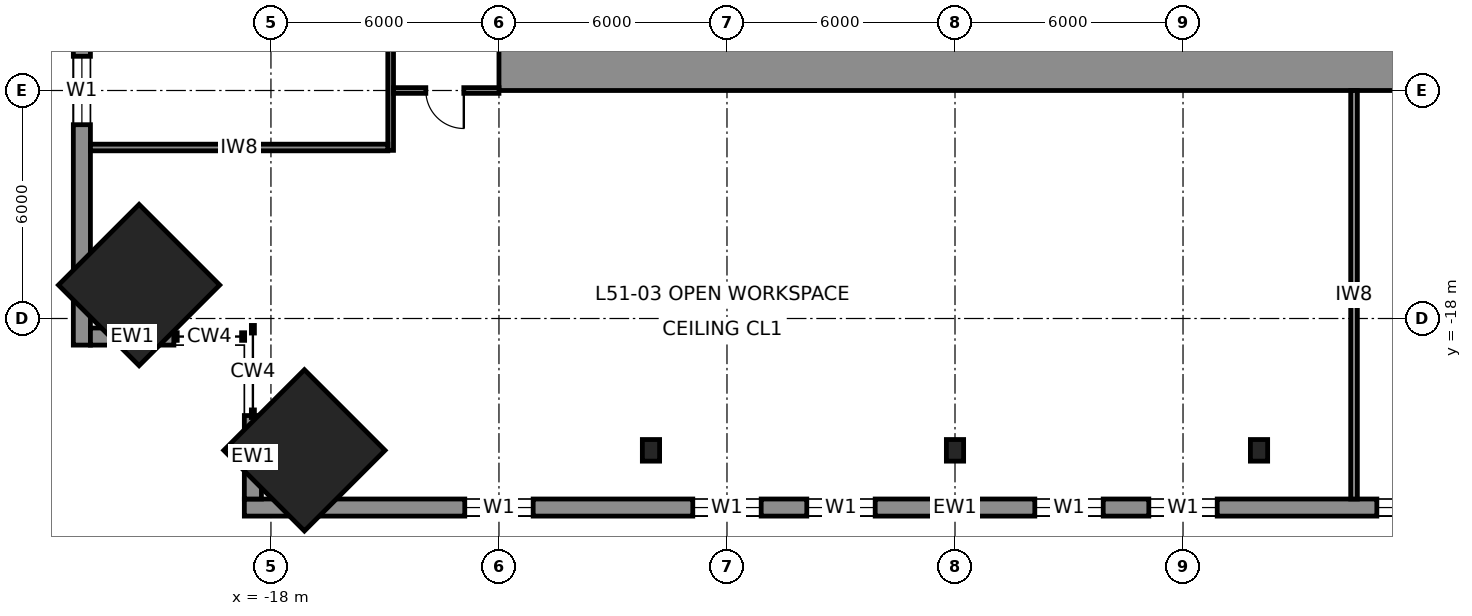
"""IFC4 building model, lengths in metres.
Left out: names, types, materials, properties, quantities, classifications, styles, units other than length and angle.
Written with IfcOpenShell. Run it as: python <this file> out.ifc"""

import sys

from ifc_helpers import new_model, si_unit, direction, frame, frame_2d, origin, origin_2d, place, context, subcontext, project, spatial, rectangle, i_section, extrude, element, fill, save


model = new_model("IFC4")
c1 = context("Model", 3, precision=1e-05, world=origin(), true_north=direction((0.0, 1.0)))
c2 = subcontext(c1, "Body", "Model", "MODEL_VIEW")
j1 = project(units=[si_unit("LENGTHUNIT", "METRE"), si_unit("PLANEANGLEUNIT", "RADIAN")], contexts=[c1])
p1 = place(None, origin())
s1 = spatial("IfcSite", under=j1, at=p1, CompositionType="ELEMENT")
p2 = place(p1, origin())
s2 = spatial("IfcBuilding", under=s1, at=p2, CompositionType="ELEMENT")
p3 = place(p2, frame((0.0, 0.0, 233.8)))
s3 = spatial("IfcBuildingStorey", under=s2, at=p3, CompositionType="ELEMENT", Elevation=233.8)
for number, where, z_axis, x_axis in (
    (1, (-17.119, -21.469, 0.0), (0.04, 0.04, 0.998), (-0.707, 0.708, 0.0)),
    (2, (-21.469, -17.119, 0.0), (0.04, 0.04, 0.998), (-0.708, 0.707, 0.0)),
):
    element("IfcColumn", number, at=place(p3, frame(where, z_axis=z_axis, x_axis=x_axis)), inside=s3, PredefinedType="COLUMN", context=c2, shape_type="SweptSolid", body=[
        extrude(rectangle(XDim=3.0, YDim=3.0, at=origin_2d()), origin(), (0.0, 0.0, 1.0), 4.007),
    ])
for number, where, z_axis, x_axis in (
    (3, (0.0, -21.469, 0.0), (0.0, 0.04, 0.999), (-1.0, 0.0, 0.0)),
    (4, (-8.0, -21.469, 0.0), (0.0, 0.04, 0.999), (-1.0, 0.0, 0.0)),
    (5, (8.0, -21.469, 0.0), (0.0, 0.04, 0.999), (-1.0, 0.0, 0.0)),
):
    element("IfcColumn", number, at=place(p3, frame(where, z_axis=z_axis, x_axis=x_axis)), inside=s3, PredefinedType="COLUMN", context=c2, shape_type="SweptSolid", body=[
        extrude(i_section(OverallWidth=0.454, OverallDepth=0.569, WebThickness=0.078, FlangeThickness=0.125, at=origin_2d()), origin(), (0.0, 0.0, 1.0), 4.003),
    ])
p4 = place(p3, frame((12.0, -11.25, 0.0), z_axis=(0.0, 0.0, 1.0), x_axis=(-1.0, 0.0, 0.0)))
e6 = element("IfcWall", 6, at=p4, inside=s3, PredefinedType="SHEAR", context=c2, shape_type="SweptSolid", body=[
    extrude(rectangle(XDim=24.0, YDim=1.5, at=frame_2d((12.0, 0.0))), origin(), (0.0, 0.0, 1.0), 4.0),
])
p5 = place(p3, frame((-18.7, -22.975, 0.0), z_axis=(0.0, 0.0, 1.0), x_axis=(1.0, 0.0, 0.0)))
e7 = element("IfcWall", 7, at=p5, inside=s3, PredefinedType="SOLIDWALL", context=c2, shape_type="SweptSolid", body=[
    extrude(rectangle(XDim=37.4, YDim=0.45, at=frame_2d((18.7, 0.0))), origin(), (0.0, 0.0, 1.0), 3.83),
])
p6 = place(p5, frame((5.8, 0.0, 0.7)))
e8 = element("IfcOpeningElement", 8, at=p6, cuts=e7, PredefinedType="OPENING", context=c2, shape_type="SweptSolid", body=[
    extrude(rectangle(XDim=1.8, YDim=2.6, at=frame_2d((0.9, 1.3))), frame((0.0, 0.235, 0.0), z_axis=(0.0, -1.0, 0.0), x_axis=(1.0, 0.0, 0.0)), (0.0, 0.0, 1.0), 0.47),
])
p7 = place(p5, frame((11.8, 0.0, 0.7)))
e9 = element("IfcOpeningElement", 9, at=p7, cuts=e7, PredefinedType="OPENING", context=c2, shape_type="SweptSolid", body=[
    extrude(rectangle(XDim=1.8, YDim=2.6, at=frame_2d((0.9, 1.3))), frame((0.0, 0.235, 0.0), z_axis=(0.0, -1.0, 0.0), x_axis=(1.0, 0.0, 0.0)), (0.0, 0.0, 1.0), 0.47),
])
p8 = place(p5, frame((14.8, 0.0, 0.7)))
e10 = element("IfcOpeningElement", 10, at=p8, cuts=e7, PredefinedType="OPENING", context=c2, shape_type="SweptSolid", body=[
    extrude(rectangle(XDim=1.8, YDim=2.6, at=frame_2d((0.9, 1.3))), frame((0.0, 0.235, 0.0), z_axis=(0.0, -1.0, 0.0), x_axis=(1.0, 0.0, 0.0)), (0.0, 0.0, 1.0), 0.47),
])
p9 = place(p5, frame((20.8, 0.0, 0.7)))
e11 = element("IfcOpeningElement", 11, at=p9, cuts=e7, PredefinedType="OPENING", context=c2, shape_type="SweptSolid", body=[
    extrude(rectangle(XDim=1.8, YDim=2.6, at=frame_2d((0.9, 1.3))), frame((0.0, 0.235, 0.0), z_axis=(0.0, -1.0, 0.0), x_axis=(1.0, 0.0, 0.0)), (0.0, 0.0, 1.0), 0.47),
])
p10 = place(p5, frame((23.8, 0.0, 0.7)))
e12 = element("IfcOpeningElement", 12, at=p10, cuts=e7, PredefinedType="OPENING", context=c2, shape_type="SweptSolid", body=[
    extrude(rectangle(XDim=1.8, YDim=2.6, at=frame_2d((0.9, 1.3))), frame((0.0, 0.235, 0.0), z_axis=(0.0, -1.0, 0.0), x_axis=(1.0, 0.0, 0.0)), (0.0, 0.0, 1.0), 0.47),
])
p11 = place(p5, frame((29.8, 0.0, 0.7)))
e13 = element("IfcOpeningElement", 13, at=p11, cuts=e7, PredefinedType="OPENING", context=c2, shape_type="SweptSolid", body=[
    extrude(rectangle(XDim=1.8, YDim=2.6, at=frame_2d((0.9, 1.3))), frame((0.0, 0.235, 0.0), z_axis=(0.0, -1.0, 0.0), x_axis=(1.0, 0.0, 0.0)), (0.0, 0.0, 1.0), 0.47),
])
p12 = place(p3, frame((-22.975, 18.7, 0.0), z_axis=(0.0, 0.0, 1.0), x_axis=(0.0, -1.0, 0.0)))
e14 = element("IfcWall", 14, at=p12, inside=s3, PredefinedType="SOLIDWALL", context=c2, shape_type="SweptSolid", body=[
    extrude(rectangle(XDim=37.4, YDim=0.45, at=frame_2d((18.7, 0.0))), origin(), (0.0, 0.0, 1.0), 3.83),
])
p13 = place(p12, frame((5.8, 0.0, 0.7)))
e15 = element("IfcOpeningElement", 15, at=p13, cuts=e14, PredefinedType="OPENING", context=c2, shape_type="SweptSolid", body=[
    extrude(rectangle(XDim=1.8, YDim=2.6, at=frame_2d((0.9, 1.3))), frame((0.0, 0.235, 0.0), z_axis=(0.0, -1.0, 0.0), x_axis=(1.0, 0.0, 0.0)), (0.0, 0.0, 1.0), 0.47),
])
p14 = place(p12, frame((11.8, 0.0, 0.7)))
e16 = element("IfcOpeningElement", 16, at=p14, cuts=e14, PredefinedType="OPENING", context=c2, shape_type="SweptSolid", body=[
    extrude(rectangle(XDim=1.8, YDim=2.6, at=frame_2d((0.9, 1.3))), frame((0.0, 0.235, 0.0), z_axis=(0.0, -1.0, 0.0), x_axis=(1.0, 0.0, 0.0)), (0.0, 0.0, 1.0), 0.47),
])
p15 = place(p12, frame((14.8, 0.0, 0.7)))
e17 = element("IfcOpeningElement", 17, at=p15, cuts=e14, PredefinedType="OPENING", context=c2, shape_type="SweptSolid", body=[
    extrude(rectangle(XDim=1.8, YDim=2.6, at=frame_2d((0.9, 1.3))), frame((0.0, 0.235, 0.0), z_axis=(0.0, -1.0, 0.0), x_axis=(1.0, 0.0, 0.0)), (0.0, 0.0, 1.0), 0.47),
])
p16 = place(p12, frame((20.8, 0.0, 0.7)))
e18 = element("IfcOpeningElement", 18, at=p16, cuts=e14, PredefinedType="OPENING", context=c2, shape_type="SweptSolid", body=[
    extrude(rectangle(XDim=1.8, YDim=2.6, at=frame_2d((0.9, 1.3))), frame((0.0, 0.235, 0.0), z_axis=(0.0, -1.0, 0.0), x_axis=(1.0, 0.0, 0.0)), (0.0, 0.0, 1.0), 0.47),
])
p17 = place(p12, frame((23.8, 0.0, 0.7)))
e19 = element("IfcOpeningElement", 19, at=p17, cuts=e14, PredefinedType="OPENING", context=c2, shape_type="SweptSolid", body=[
    extrude(rectangle(XDim=1.8, YDim=2.6, at=frame_2d((0.9, 1.3))), frame((0.0, 0.235, 0.0), z_axis=(0.0, -1.0, 0.0), x_axis=(1.0, 0.0, 0.0)), (0.0, 0.0, 1.0), 0.47),
])
p18 = place(p12, frame((29.8, 0.0, 0.7)))
e20 = element("IfcOpeningElement", 20, at=p18, cuts=e14, PredefinedType="OPENING", context=c2, shape_type="SweptSolid", body=[
    extrude(rectangle(XDim=1.8, YDim=2.6, at=frame_2d((0.9, 1.3))), frame((0.0, 0.235, 0.0), z_axis=(0.0, -1.0, 0.0), x_axis=(1.0, 0.0, 0.0)), (0.0, 0.0, 1.0), 0.47),
])
for number, where, z_axis, x_axis in (
    (21, (-18.475, -20.554, 0.0), (0.0, 0.0, 1.0), (0.0, -1.0, 0.0)),
    (22, (-20.554, -18.475, 0.0), (0.0, 0.0, 1.0), (-1.0, 0.0, 0.0)),
):
    element("IfcWall", number, at=place(p3, frame(where, z_axis=z_axis, x_axis=x_axis)), inside=s3, PredefinedType="SOLIDWALL", context=c2, shape_type="SweptSolid", body=[
        extrude(rectangle(XDim=2.196, YDim=0.45, at=frame_2d((1.098, 0.0))), origin(), (0.0, 0.0, 1.0), 3.83),
    ])
p19 = place(p3, frame((-14.85, 13.575, 0.0), z_axis=(0.0, 0.0, 1.0), x_axis=(0.0, -1.0, 0.0)))
e23 = element("IfcWall", 23, at=p19, inside=s3, PredefinedType="PARTITIONING", context=c2, shape_type="SweptSolid", body=[
    extrude(rectangle(XDim=27.15, YDim=0.15, at=frame_2d((13.575, 0.0))), origin(), (0.0, 0.0, 1.0), 3.83),
])
p20 = place(p19, frame((21.125, 0.0, 0.0)))
e24 = element("IfcOpeningElement", 24, at=p20, cuts=e23, PredefinedType="OPENING", context=c2, shape_type="SweptSolid", body=[
    extrude(rectangle(XDim=1.6, YDim=2.3, at=frame_2d((0.8, 1.15))), frame((0.0, 0.085, 0.0), z_axis=(0.0, -1.0, 0.0), x_axis=(1.0, 0.0, 0.0)), (0.0, 0.0, 1.0), 0.17),
])
p21 = place(p19, frame((16.575, 0.0, 0.0)))
e25 = element("IfcOpeningElement", 25, at=p21, cuts=e23, PredefinedType="OPENING", context=c2, shape_type="SweptSolid", body=[
    extrude(rectangle(XDim=1.0, YDim=2.3, at=frame_2d((0.5, 1.15))), frame((0.0, 0.085, 0.0), z_axis=(0.0, -1.0, 0.0), x_axis=(1.0, 0.0, 0.0)), (0.0, 0.0, 1.0), 0.17),
])
p22 = place(p19, frame((9.325, 0.0, 0.0)))
e26 = element("IfcOpeningElement", 26, at=p22, cuts=e23, PredefinedType="OPENING", context=c2, shape_type="SweptSolid", body=[
    extrude(rectangle(XDim=1.0, YDim=2.3, at=frame_2d((0.5, 1.15))), frame((0.0, 0.085, 0.0), z_axis=(0.0, -1.0, 0.0), x_axis=(1.0, 0.0, 0.0)), (0.0, 0.0, 1.0), 0.17),
])
p23 = place(p3, frame((-12.0, -12.0, 0.0), z_axis=(0.0, 0.0, 1.0), x_axis=(-1.0, 0.0, 0.0)))
e27 = element("IfcWall", 27, at=p23, inside=s3, PredefinedType="PARTITIONING", context=c2, shape_type="SweptSolid", body=[
    extrude(rectangle(XDim=2.775, YDim=0.15, at=frame_2d((1.387, 0.0))), origin(), (0.0, 0.0, 1.0), 3.83),
])
p24 = place(p23, frame((0.925, 0.0, 0.0)))
e28 = element("IfcOpeningElement", 28, at=p24, cuts=e27, PredefinedType="OPENING", context=c2, shape_type="SweptSolid", body=[
    extrude(rectangle(XDim=1.0, YDim=2.3, at=frame_2d((0.5, 1.15))), frame((0.0, 0.085, 0.0), z_axis=(0.0, -1.0, 0.0), x_axis=(1.0, 0.0, 0.0)), (0.0, 0.0, 1.0), 0.17),
])
p25 = place(p3, frame((-14.925, -13.5, 0.0), z_axis=(0.0, 0.0, 1.0), x_axis=(-1.0, 0.0, 0.0)))
e29 = element("IfcWall", 29, at=p25, inside=s3, PredefinedType="PARTITIONING", context=c2, shape_type="SweptSolid", body=[
    extrude(rectangle(XDim=7.825, YDim=0.175, at=frame_2d((3.913, 0.0))), origin(), (0.0, 0.0, 1.0), 3.83),
])
p26 = place(p3, frame((10.5, -12.0, 0.0), z_axis=(0.0, 0.0, 1.0), x_axis=(0.0, -1.0, 0.0)))
e30 = element("IfcWall", 30, at=p26, inside=s3, PredefinedType="PARTITIONING", context=c2, shape_type="SweptSolid", body=[
    extrude(rectangle(XDim=10.75, YDim=0.175, at=frame_2d((5.375, 0.0))), origin(), (0.0, 0.0, 1.0), 3.83),
])
p27 = place(p6, origin())
e31 = element("IfcWindow", 31, at=p27, inside=s3, PartitioningType="SINGLE_PANEL", PredefinedType="WINDOW", context=c2, shape_type="SweptSolid", body=[
    extrude(rectangle(XDim=1.8, YDim=2.6, at=frame_2d((0.9, 1.3))), frame((0.0, 0.03, 0.0), z_axis=(0.0, -1.0, 0.0), x_axis=(1.0, 0.0, 0.0)), (0.0, 0.0, 1.0), 0.06),
])
fill(e8, e31)
p28 = place(p7, origin())
e32 = element("IfcWindow", 32, at=p28, inside=s3, PartitioningType="SINGLE_PANEL", PredefinedType="WINDOW", context=c2, shape_type="SweptSolid", body=[
    extrude(rectangle(XDim=1.8, YDim=2.6, at=frame_2d((0.9, 1.3))), frame((0.0, 0.03, 0.0), z_axis=(0.0, -1.0, 0.0), x_axis=(1.0, 0.0, 0.0)), (0.0, 0.0, 1.0), 0.06),
])
fill(e9, e32)
p29 = place(p8, origin())
e33 = element("IfcWindow", 33, at=p29, inside=s3, PartitioningType="SINGLE_PANEL", PredefinedType="WINDOW", context=c2, shape_type="SweptSolid", body=[
    extrude(rectangle(XDim=1.8, YDim=2.6, at=frame_2d((0.9, 1.3))), frame((0.0, 0.03, 0.0), z_axis=(0.0, -1.0, 0.0), x_axis=(1.0, 0.0, 0.0)), (0.0, 0.0, 1.0), 0.06),
])
fill(e10, e33)
p30 = place(p9, origin())
e34 = element("IfcWindow", 34, at=p30, inside=s3, PartitioningType="SINGLE_PANEL", PredefinedType="WINDOW", context=c2, shape_type="SweptSolid", body=[
    extrude(rectangle(XDim=1.8, YDim=2.6, at=frame_2d((0.9, 1.3))), frame((0.0, 0.03, 0.0), z_axis=(0.0, -1.0, 0.0), x_axis=(1.0, 0.0, 0.0)), (0.0, 0.0, 1.0), 0.06),
])
fill(e11, e34)
p31 = place(p10, origin())
e35 = element("IfcWindow", 35, at=p31, inside=s3, PartitioningType="SINGLE_PANEL", PredefinedType="WINDOW", context=c2, shape_type="SweptSolid", body=[
    extrude(rectangle(XDim=1.8, YDim=2.6, at=frame_2d((0.9, 1.3))), frame((0.0, 0.03, 0.0), z_axis=(0.0, -1.0, 0.0), x_axis=(1.0, 0.0, 0.0)), (0.0, 0.0, 1.0), 0.06),
])
fill(e12, e35)
p32 = place(p11, origin())
e36 = element("IfcWindow", 36, at=p32, inside=s3, PartitioningType="SINGLE_PANEL", PredefinedType="WINDOW", context=c2, shape_type="SweptSolid", body=[
    extrude(rectangle(XDim=1.8, YDim=2.6, at=frame_2d((0.9, 1.3))), frame((0.0, 0.03, 0.0), z_axis=(0.0, -1.0, 0.0), x_axis=(1.0, 0.0, 0.0)), (0.0, 0.0, 1.0), 0.06),
])
fill(e13, e36)
p33 = place(p18, origin())
e37 = element("IfcWindow", 37, at=p33, inside=s3, PartitioningType="SINGLE_PANEL", PredefinedType="WINDOW", context=c2, shape_type="SweptSolid", body=[
    extrude(rectangle(XDim=1.8, YDim=2.6, at=frame_2d((0.9, 1.3))), frame((0.0, 0.03, 0.0), z_axis=(0.0, -1.0, 0.0), x_axis=(1.0, 0.0, 0.0)), (0.0, 0.0, 1.0), 0.06),
])
fill(e20, e37)
p34 = place(p24, origin())
e38 = element("IfcDoor", 38, at=p34, inside=s3, OperationType="SINGLE_SWING_LEFT", PredefinedType="DOOR", context=c2, shape_type="SweptSolid", body=[
    extrude(rectangle(XDim=1.0, YDim=2.3, at=frame_2d((0.5, 1.15))), frame((0.0, 0.025, 0.0), z_axis=(0.0, -1.0, 0.0), x_axis=(1.0, 0.0, 0.0)), (0.0, 0.0, 1.0), 0.05),
])
fill(e28, e38)
save(model, sys.argv[1])
